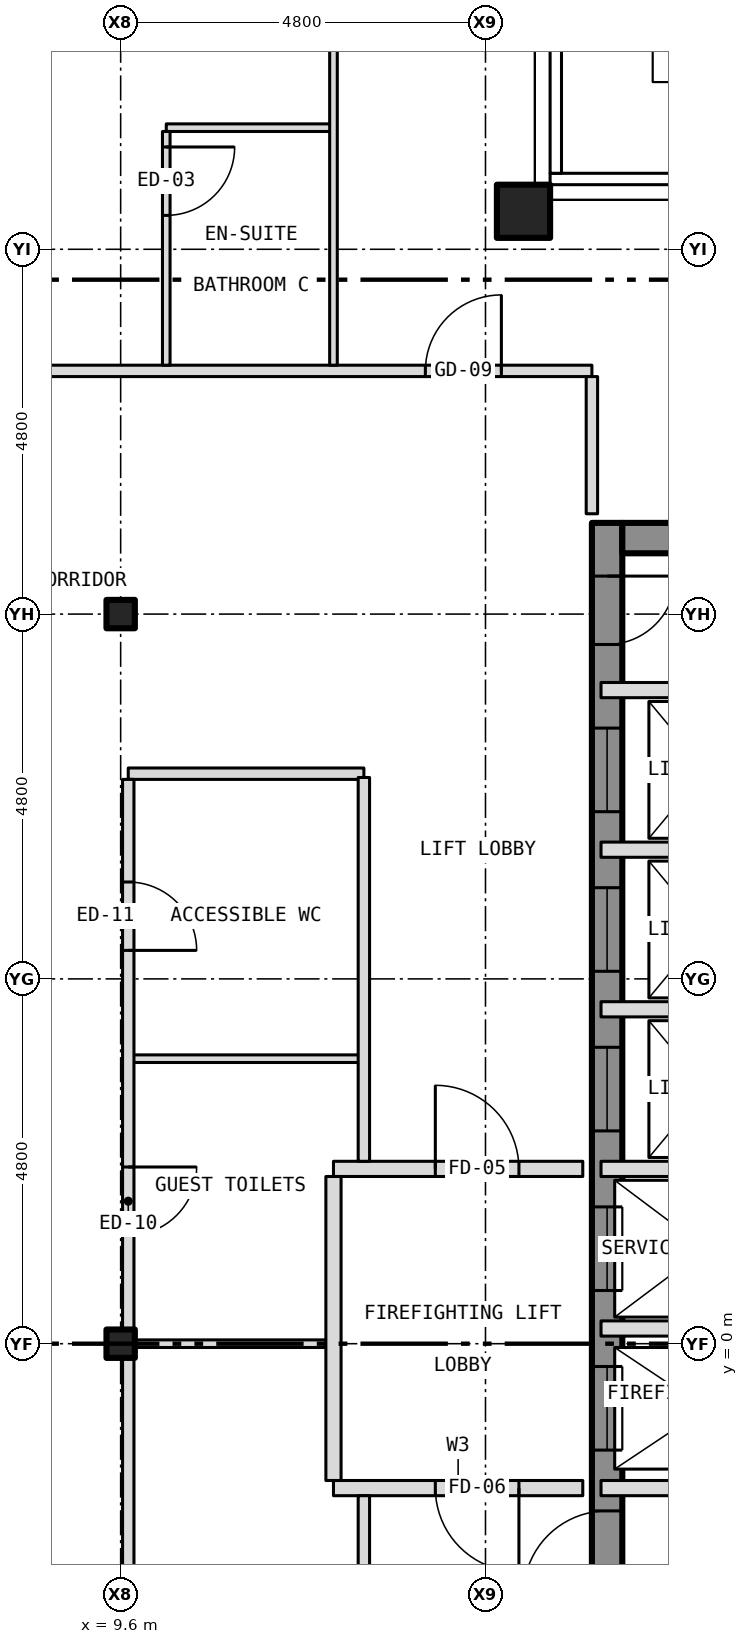
"""IFC4 building model, lengths in metres.
Left out: names, types, materials, properties, quantities, classifications, styles, units other than length and angle.
Written with IfcOpenShell. Run it as: python <this file> out.ifc"""

import sys

from ifc_helpers import new_model, si_unit, direction, frame, frame_2d, origin, origin_2d, place, context, subcontext, project, spatial, rectangle, hollow_rectangle, i_section, extrude, element, fill, save


model = new_model("IFC4")
c1 = context("Model", 3, precision=1e-05, world=origin(), true_north=direction((0.0, 1.0)))
c2 = subcontext(c1, "Body", "Model", "MODEL_VIEW")
j1 = project(units=[si_unit("LENGTHUNIT", "METRE"), si_unit("PLANEANGLEUNIT", "RADIAN")], contexts=[c1])
p1 = place(None, origin())
s1 = spatial("IfcSite", under=j1, at=p1, CompositionType="ELEMENT")
p2 = place(p1, origin())
s2 = spatial("IfcBuilding", under=s1, at=p2, CompositionType="ELEMENT")
p3 = place(p2, frame((0.0, 0.0, 191.0)))
s3 = spatial("IfcBuildingStorey", under=s2, at=p3, CompositionType="ELEMENT", Elevation=191.0)
p4 = place(p3, frame((14.9, 14.9, -0.15), z_axis=(0.0, 0.0, 1.0), x_axis=(1.0, 0.0, 0.0)))
e1 = element("IfcColumn", 1, at=p4, inside=s3, PredefinedType="COLUMN", context=c2, shape_type="SweptSolid", body=[
    extrude(hollow_rectangle(XDim=0.7, YDim=0.7, WallThickness=0.04, at=origin_2d()), origin(), (0.0, 0.0, 1.0), 3.5),
])
for number, where, z_axis, x_axis in (
    (2, (9.6, 0.0, -0.15), (0.0, 0.0, 1.0), (1.0, 0.0, 0.0)),
    (3, (9.6, 9.6, -0.15), (0.0, 0.0, 1.0), (1.0, 0.0, 0.0)),
):
    element("IfcColumn", number, at=place(p3, frame(where, z_axis=z_axis, x_axis=x_axis)), inside=s3, PredefinedType="COLUMN", context=c2, shape_type="SweptSolid", body=[
        extrude(i_section(OverallWidth=0.373, OverallDepth=0.373, WebThickness=0.016, FlangeThickness=0.026, at=origin_2d()), origin(), (0.0, 0.0, 1.0), 3.5),
    ])
p5 = place(p3, frame((16.0, -10.8, 0.0), z_axis=(0.0, 0.0, 1.0), x_axis=(0.0, 1.0, 0.0)))
e4 = element("IfcWall", 4, at=p5, inside=s3, PredefinedType="SHEAR", context=c2, shape_type="SweptSolid", body=[
    extrude(rectangle(XDim=21.6, YDim=0.4, at=frame_2d((10.8, 0.0))), origin(), (0.0, 0.0, 1.0), 3.25),
])
p6 = place(p5, frame((9.4, 0.0, 0.0)))
e5 = element("IfcOpeningElement", 5, at=p6, cuts=e4, PredefinedType="OPENING", context=c2, shape_type="SweptSolid", body=[
    extrude(rectangle(XDim=1.1, YDim=2.1, at=frame_2d((0.55, 1.05))), frame((0.0, 0.212, 0.0), z_axis=(0.0, -1.0, 0.0), x_axis=(1.0, 0.0, 0.0)), (0.0, 0.0, 1.0), 0.424),
])
p7 = place(p5, frame((11.5, 0.0, 0.0)))
e6 = element("IfcOpeningElement", 6, at=p7, cuts=e4, PredefinedType="OPENING", context=c2, shape_type="SweptSolid", body=[
    extrude(rectangle(XDim=1.1, YDim=2.1, at=frame_2d((0.55, 1.05))), frame((0.0, 0.212, 0.0), z_axis=(0.0, -1.0, 0.0), x_axis=(1.0, 0.0, 0.0)), (0.0, 0.0, 1.0), 0.424),
])
p8 = place(p5, frame((13.6, 0.0, 0.0)))
e7 = element("IfcOpeningElement", 7, at=p8, cuts=e4, PredefinedType="OPENING", context=c2, shape_type="SweptSolid", body=[
    extrude(rectangle(XDim=1.1, YDim=2.1, at=frame_2d((0.55, 1.05))), frame((0.0, 0.212, 0.0), z_axis=(0.0, -1.0, 0.0), x_axis=(1.0, 0.0, 0.0)), (0.0, 0.0, 1.0), 0.424),
])
p9 = place(p5, frame((15.7, 0.0, 0.0)))
e8 = element("IfcOpeningElement", 8, at=p9, cuts=e4, PredefinedType="OPENING", context=c2, shape_type="SweptSolid", body=[
    extrude(rectangle(XDim=1.1, YDim=2.1, at=frame_2d((0.55, 1.05))), frame((0.0, 0.212, 0.0), z_axis=(0.0, -1.0, 0.0), x_axis=(1.0, 0.0, 0.0)), (0.0, 0.0, 1.0), 0.424),
])
p10 = place(p5, frame((17.8, 0.0, 0.0)))
e9 = element("IfcOpeningElement", 9, at=p10, cuts=e4, PredefinedType="OPENING", context=c2, shape_type="SweptSolid", body=[
    extrude(rectangle(XDim=1.1, YDim=2.1, at=frame_2d((0.55, 1.05))), frame((0.0, 0.212, 0.0), z_axis=(0.0, -1.0, 0.0), x_axis=(1.0, 0.0, 0.0)), (0.0, 0.0, 1.0), 0.424),
])
p11 = place(p5, frame((5.642, 0.0, 0.0)))
e10 = element("IfcOpeningElement", 10, at=p11, cuts=e4, PredefinedType="OPENING", context=c2, shape_type="SweptSolid", body=[
    extrude(rectangle(XDim=1.1, YDim=2.1, at=frame_2d((0.55, 1.05))), frame((0.0, 0.212, 0.0), z_axis=(0.0, -1.0, 0.0), x_axis=(1.0, 0.0, 0.0)), (0.0, 0.0, 1.0), 0.424),
])
p12 = place(p5, frame((7.5, 0.0, 0.0)))
e11 = element("IfcOpeningElement", 11, at=p12, cuts=e4, PredefinedType="OPENING", context=c2, shape_type="SweptSolid", body=[
    extrude(rectangle(XDim=1.1, YDim=2.1, at=frame_2d((0.55, 1.05))), frame((0.0, 0.212, 0.0), z_axis=(0.0, -1.0, 0.0), x_axis=(1.0, 0.0, 0.0)), (0.0, 0.0, 1.0), 0.424),
])
p13 = place(p5, frame((20.0, 0.0, 0.0)))
e12 = element("IfcOpeningElement", 12, at=p13, cuts=e4, PredefinedType="OPENING", context=c2, shape_type="SweptSolid", body=[
    extrude(rectangle(XDim=0.9, YDim=2.1, at=frame_2d((0.45, 1.05))), frame((0.0, 0.212, 0.0), z_axis=(0.0, -1.0, 0.0), x_axis=(1.0, 0.0, 0.0)), (0.0, 0.0, 1.0), 0.424),
])
p14 = place(p3, frame((16.2, 10.6, 0.0), z_axis=(0.0, 0.0, 1.0), x_axis=(1.0, 0.0, 0.0)))
e13 = element("IfcWall", 13, at=p14, inside=s3, PredefinedType="SHEAR", context=c2, shape_type="SweptSolid", body=[
    extrude(rectangle(XDim=3.8, YDim=0.4, at=frame_2d((1.9, 0.0))), origin(), (0.0, 0.0, 1.0), 3.25),
])
p15 = place(p3, frame((12.4, -1.9, 0.0), z_axis=(0.0, 0.0, 1.0), x_axis=(1.0, 0.0, 0.0)))
e14 = element("IfcWall", 14, at=p15, inside=s3, PredefinedType="PARTITIONING", context=c2, shape_type="SweptSolid", body=[
    extrude(rectangle(XDim=3.28, YDim=0.2, at=frame_2d((1.64, 0.0))), origin(), (0.0, 0.0, 1.0), 3.35),
])
p16 = place(p15, frame((1.34, 0.0, 0.0)))
e15 = element("IfcOpeningElement", 15, at=p16, cuts=e14, PredefinedType="OPENING", context=c2, shape_type="SweptSolid", body=[
    extrude(rectangle(XDim=1.1, YDim=2.1, at=frame_2d((0.55, 1.05))), frame((0.0, 0.112, 0.0), z_axis=(0.0, -1.0, 0.0), x_axis=(1.0, 0.0, 0.0)), (0.0, 0.0, 1.0), 0.224),
])
p17 = place(p3, frame((15.92, -1.9, 0.0), z_axis=(0.0, 0.0, 1.0), x_axis=(1.0, 0.0, 0.0)))
e16 = element("IfcWall", 16, at=p17, inside=s3, PredefinedType="PARTITIONING", context=c2, shape_type="SweptSolid", body=[
    extrude(rectangle(XDim=4.36, YDim=0.2, at=frame_2d((2.18, 0.0))), origin(), (0.0, 0.0, 1.0), 3.25),
])
p18 = place(p17, frame((3.18, 0.0, 0.0)))
e17 = element("IfcOpeningElement", 17, at=p18, cuts=e16, PredefinedType="OPENING", context=c2, shape_type="SweptSolid", body=[
    extrude(rectangle(XDim=0.9, YDim=2.1, at=frame_2d((0.45, 1.05))), frame((0.0, 0.112, 0.0), z_axis=(0.0, -1.0, 0.0), x_axis=(1.0, 0.0, 0.0)), (0.0, 0.0, 1.0), 0.224),
])
p19 = place(p3, frame((9.7, 0.0, 0.0), z_axis=(0.0, 0.0, 1.0), x_axis=(1.0, 0.0, 0.0)))
e18 = element("IfcWall", 18, at=p19, inside=s3, PredefinedType="PARTITIONING", context=c2, shape_type="SweptSolid", body=[
    extrude(rectangle(XDim=2.7, YDim=0.1, at=frame_2d((1.35, 0.0))), origin(), (0.0, 0.0, 1.0), 2.728),
])
p20 = place(p3, frame((15.92, 0.2, 0.0), z_axis=(0.0, 0.0, 1.0), x_axis=(1.0, 0.0, 0.0)))
e19 = element("IfcWall", 19, at=p20, inside=s3, PredefinedType="PARTITIONING", context=c2, shape_type="SweptSolid", body=[
    extrude(rectangle(XDim=2.88, YDim=0.2, at=frame_2d((1.44, 0.0))), origin(), (0.0, 0.0, 1.0), 3.25),
])
p21 = place(p3, frame((12.4, 2.3, 0.0), z_axis=(0.0, 0.0, 1.0), x_axis=(1.0, 0.0, 0.0)))
e20 = element("IfcWall", 20, at=p21, inside=s3, PredefinedType="PARTITIONING", context=c2, shape_type="SweptSolid", body=[
    extrude(rectangle(XDim=3.28, YDim=0.2, at=frame_2d((1.64, 0.0))), origin(), (0.0, 0.0, 1.0), 3.35),
])
p22 = place(p21, frame((1.34, 0.0, 0.0)))
e21 = element("IfcOpeningElement", 21, at=p22, cuts=e20, PredefinedType="OPENING", context=c2, shape_type="SweptSolid", body=[
    extrude(rectangle(XDim=1.1, YDim=2.1, at=frame_2d((0.55, 1.05))), frame((0.0, 0.112, 0.0), z_axis=(0.0, -1.0, 0.0), x_axis=(1.0, 0.0, 0.0)), (0.0, 0.0, 1.0), 0.224),
])
p23 = place(p3, frame((15.92, 2.3, 0.0), z_axis=(0.0, 0.0, 1.0), x_axis=(1.0, 0.0, 0.0)))
e22 = element("IfcWall", 22, at=p23, inside=s3, PredefinedType="PARTITIONING", context=c2, shape_type="SweptSolid", body=[
    extrude(rectangle(XDim=2.88, YDim=0.2, at=frame_2d((1.44, 0.0))), origin(), (0.0, 0.0, 1.0), 3.25),
])
p24 = place(p3, frame((9.7, 3.75, 0.0), z_axis=(0.0, 0.0, 1.0), x_axis=(1.0, 0.0, 0.0)))
e23 = element("IfcWall", 23, at=p24, inside=s3, PredefinedType="PARTITIONING", context=c2, shape_type="SweptSolid", body=[
    extrude(rectangle(XDim=3.1, YDim=0.1, at=frame_2d((1.55, 0.0))), origin(), (0.0, 0.0, 1.0), 3.35),
])
for number, where, z_axis, x_axis in (
    (24, (15.92, 4.4, 0.0), (0.0, 0.0, 1.0), (1.0, 0.0, 0.0)),
    (25, (15.92, 6.5, 0.0), (0.0, 0.0, 1.0), (1.0, 0.0, 0.0)),
):
    element("IfcWall", number, at=place(p3, frame(where, z_axis=z_axis, x_axis=x_axis)), inside=s3, PredefinedType="PARTITIONING", context=c2, shape_type="SweptSolid", body=[
        extrude(rectangle(XDim=2.88, YDim=0.2, at=frame_2d((1.44, 0.0))), origin(), (0.0, 0.0, 1.0), 3.25),
    ])
p25 = place(p3, frame((9.7, 7.5, 0.0), z_axis=(0.0, 0.0, 1.0), x_axis=(1.0, 0.0, 0.0)))
e26 = element("IfcWall", 26, at=p25, inside=s3, PredefinedType="PARTITIONING", context=c2, shape_type="SweptSolid", body=[
    extrude(rectangle(XDim=3.1, YDim=0.15, at=frame_2d((1.55, 0.0))), origin(), (0.0, 0.0, 1.0), 3.35),
])
p26 = place(p3, frame((15.92, 8.6, 0.0), z_axis=(0.0, 0.0, 1.0), x_axis=(1.0, 0.0, 0.0)))
e27 = element("IfcWall", 27, at=p26, inside=s3, PredefinedType="PARTITIONING", context=c2, shape_type="SweptSolid", body=[
    extrude(rectangle(XDim=4.36, YDim=0.2, at=frame_2d((2.18, 0.0))), origin(), (0.0, 0.0, 1.0), 3.25),
])
p27 = place(p3, frame((-15.8, 12.8, 0.0), z_axis=(0.0, 0.0, 1.0), x_axis=(1.0, 0.0, 0.0)))
e28 = element("IfcWall", 28, at=p27, inside=s3, PredefinedType="PARTITIONING", context=c2, shape_type="SweptSolid", body=[
    extrude(rectangle(XDim=31.6, YDim=0.15, at=frame_2d((15.8, 0.0))), origin(), (0.0, 0.0, 1.0), 3.35),
])
p28 = place(p27, frame((7.708, 0.0, 0.0)))
e29 = element("IfcOpeningElement", 29, at=p28, cuts=e28, PredefinedType="OPENING", context=c2, shape_type="SweptSolid", body=[
    extrude(rectangle(XDim=1.0, YDim=2.1, at=frame_2d((0.5, 1.05))), frame((0.0, 0.087, 0.0), z_axis=(0.0, -1.0, 0.0), x_axis=(1.0, 0.0, 0.0)), (0.0, 0.0, 1.0), 0.174),
])
p29 = place(p27, frame((12.568, 0.0, 0.0)))
e30 = element("IfcOpeningElement", 30, at=p29, cuts=e28, PredefinedType="OPENING", context=c2, shape_type="SweptSolid", body=[
    extrude(rectangle(XDim=1.0, YDim=2.1, at=frame_2d((0.5, 1.05))), frame((0.0, 0.087, 0.0), z_axis=(0.0, -1.0, 0.0), x_axis=(1.0, 0.0, 0.0)), (0.0, 0.0, 1.0), 0.174),
])
p30 = place(p27, frame((22.892, 0.0, 0.0)))
e31 = element("IfcOpeningElement", 31, at=p30, cuts=e28, PredefinedType="OPENING", context=c2, shape_type="SweptSolid", body=[
    extrude(rectangle(XDim=1.0, YDim=2.1, at=frame_2d((0.5, 1.05))), frame((0.0, 0.087, 0.0), z_axis=(0.0, -1.0, 0.0), x_axis=(1.0, 0.0, 0.0)), (0.0, 0.0, 1.0), 0.174),
])
p31 = place(p27, frame((1.192, 0.0, 0.0)))
e32 = element("IfcOpeningElement", 32, at=p31, cuts=e28, PredefinedType="OPENING", context=c2, shape_type="SweptSolid", body=[
    extrude(rectangle(XDim=1.0, YDim=2.1, at=frame_2d((0.5, 1.05))), frame((0.0, 0.087, 0.0), z_axis=(0.0, -1.0, 0.0), x_axis=(1.0, 0.0, 0.0)), (0.0, 0.0, 1.0), 0.174),
])
p32 = place(p27, frame((29.409, 0.0, 0.0)))
e33 = element("IfcOpeningElement", 33, at=p32, cuts=e28, PredefinedType="OPENING", context=c2, shape_type="SweptSolid", body=[
    extrude(rectangle(XDim=1.0, YDim=2.1, at=frame_2d((0.5, 1.05))), frame((0.0, 0.087, 0.0), z_axis=(0.0, -1.0, 0.0), x_axis=(1.0, 0.0, 0.0)), (0.0, 0.0, 1.0), 0.174),
])
p33 = place(p3, frame((10.2, 16.0, 0.0), z_axis=(0.0, 0.0, 1.0), x_axis=(1.0, 0.0, 0.0)))
e34 = element("IfcWall", 34, at=p33, inside=s3, PredefinedType="PARTITIONING", context=c2, shape_type="SweptSolid", body=[
    extrude(rectangle(XDim=2.2, YDim=0.1, at=frame_2d((1.1, 0.0))), origin(), (0.0, 0.0, 1.0), 3.35),
])
p34 = place(p3, frame((9.7, -9.413, 0.0), z_axis=(0.0, 0.0, 1.0), x_axis=(0.0, 1.0, 0.0)))
e35 = element("IfcWall", 35, at=p34, inside=s3, PredefinedType="PARTITIONING", context=c2, shape_type="SweptSolid", body=[
    extrude(rectangle(XDim=9.226, YDim=0.15, at=frame_2d((4.613, 0.0))), origin(), (0.0, 0.0, 1.0), 2.728),
])
p35 = place(p34, frame((3.663, 0.0, 0.0)))
e36 = element("IfcOpeningElement", 36, at=p35, cuts=e35, PredefinedType="OPENING", context=c2, shape_type="SweptSolid", body=[
    extrude(rectangle(XDim=0.9, YDim=2.1, at=frame_2d((0.45, 1.05))), frame((0.0, 0.087, 0.0), z_axis=(0.0, -1.0, 0.0), x_axis=(1.0, 0.0, 0.0)), (0.0, 0.0, 1.0), 0.174),
])
p36 = place(p3, frame((9.7, -0.187, 0.0), z_axis=(0.0, 0.0, 1.0), x_axis=(0.0, 1.0, 0.0)))
e37 = element("IfcWall", 37, at=p36, inside=s3, PredefinedType="PARTITIONING", context=c2, shape_type="SweptSolid", body=[
    extrude(rectangle(XDim=0.374, YDim=0.15, at=frame_2d((0.187, 0.0))), origin(), (0.0, 0.0, 1.0), 3.35),
])
p37 = place(p3, frame((9.7, 0.187, 0.0), z_axis=(0.0, 0.0, 1.0), x_axis=(0.0, 1.0, 0.0)))
e38 = element("IfcWall", 38, at=p37, inside=s3, PredefinedType="PARTITIONING", context=c2, shape_type="SweptSolid", body=[
    extrude(rectangle(XDim=7.238, YDim=0.15, at=frame_2d((3.619, 0.0))), origin(), (0.0, 0.0, 1.0), 2.728),
])
p38 = place(p37, frame((1.238, 0.0, 0.0)))
e39 = element("IfcOpeningElement", 39, at=p38, cuts=e38, PredefinedType="OPENING", context=c2, shape_type="SweptSolid", body=[
    extrude(rectangle(XDim=0.9, YDim=2.1, at=frame_2d((0.45, 1.05))), frame((0.0, 0.087, 0.0), z_axis=(0.0, -1.0, 0.0), x_axis=(1.0, 0.0, 0.0)), (0.0, 0.0, 1.0), 0.174),
])
p39 = place(p37, frame((4.988, 0.0, 0.0)))
e40 = element("IfcOpeningElement", 40, at=p39, cuts=e38, PredefinedType="OPENING", context=c2, shape_type="SweptSolid", body=[
    extrude(rectangle(XDim=0.9, YDim=2.1, at=frame_2d((0.45, 1.05))), frame((0.0, 0.087, 0.0), z_axis=(0.0, -1.0, 0.0), x_axis=(1.0, 0.0, 0.0)), (0.0, 0.0, 1.0), 0.174),
])
p40 = place(p3, frame((10.2, 12.875, 0.0), z_axis=(0.0, 0.0, 1.0), x_axis=(0.0, 1.0, 0.0)))
e41 = element("IfcWall", 41, at=p40, inside=s3, PredefinedType="PARTITIONING", context=c2, shape_type="SweptSolid", body=[
    extrude(rectangle(XDim=3.075, YDim=0.1, at=frame_2d((1.538, 0.0))), origin(), (0.0, 0.0, 1.0), 3.35),
])
p41 = place(p40, frame((1.971, 0.0, 0.0)))
e42 = element("IfcOpeningElement", 42, at=p41, cuts=e41, PredefinedType="OPENING", context=c2, shape_type="SweptSolid", body=[
    extrude(rectangle(XDim=0.9, YDim=2.1, at=frame_2d((0.45, 1.05))), frame((0.0, 0.062, 0.0), z_axis=(0.0, -1.0, 0.0), x_axis=(1.0, 0.0, 0.0)), (0.0, 0.0, 1.0), 0.124),
])
p42 = place(p3, frame((12.4, -1.8, 0.0), z_axis=(0.0, 0.0, 1.0), x_axis=(0.0, 1.0, 0.0)))
e43 = element("IfcWall", 43, at=p42, inside=s3, PredefinedType="PARTITIONING", context=c2, shape_type="SweptSolid", body=[
    extrude(rectangle(XDim=4.0, YDim=0.2, at=frame_2d((2.0, 0.0))), origin(), (0.0, 0.0, 1.0), 3.35),
])
p43 = place(p3, frame((12.4, 12.875, 0.0), z_axis=(0.0, 0.0, 1.0), x_axis=(0.0, 1.0, 0.0)))
e44 = element("IfcWall", 44, at=p43, inside=s3, PredefinedType="PARTITIONING", context=c2, shape_type="SweptSolid", body=[
    extrude(rectangle(XDim=7.905, YDim=0.1, at=frame_2d((3.953, 0.0))), origin(), (0.0, 0.0, 1.0), 3.35),
])
p44 = place(p3, frame((12.8, -10.525, 0.0), z_axis=(0.0, 0.0, 1.0), x_axis=(0.0, 1.0, 0.0)))
e45 = element("IfcWall", 45, at=p44, inside=s3, PredefinedType="PARTITIONING", context=c2, shape_type="SweptSolid", body=[
    extrude(rectangle(XDim=8.525, YDim=0.15, at=frame_2d((4.262, 0.0))), origin(), (0.0, 0.0, 1.0), 3.35),
])
p45 = place(p3, frame((12.8, 2.4, 0.0), z_axis=(0.0, 0.0, 1.0), x_axis=(0.0, 1.0, 0.0)))
e46 = element("IfcWall", 46, at=p45, inside=s3, PredefinedType="PARTITIONING", context=c2, shape_type="SweptSolid", body=[
    extrude(rectangle(XDim=5.05, YDim=0.15, at=frame_2d((2.525, 0.0))), origin(), (0.0, 0.0, 1.0), 3.35),
])
p46 = place(p3, frame((15.8, 10.92, 0.0), z_axis=(0.0, 0.0, 1.0), x_axis=(0.0, 1.0, 0.0)))
e47 = element("IfcWall", 47, at=p46, inside=s3, PredefinedType="PARTITIONING", context=c2, shape_type="SweptSolid", body=[
    extrude(rectangle(XDim=1.805, YDim=0.15, at=frame_2d((0.903, 0.0))), origin(), (0.0, 0.0, 1.0), 3.35),
])
p47 = place(p6, origin())
e48 = element("IfcDoor", 48, at=p47, inside=s3, OperationType="SLIDING_TO_LEFT", PredefinedType="DOOR", context=c2, shape_type="SweptSolid", body=[
    extrude(rectangle(XDim=1.1, YDim=2.1, at=frame_2d((0.55, 1.05))), frame((0.0, 0.025, 0.0), z_axis=(0.0, -1.0, 0.0), x_axis=(1.0, 0.0, 0.0)), (0.0, 0.0, 1.0), 0.05),
])
fill(e5, e48)
p48 = place(p7, origin())
e49 = element("IfcDoor", 49, at=p48, inside=s3, OperationType="SLIDING_TO_LEFT", PredefinedType="DOOR", context=c2, shape_type="SweptSolid", body=[
    extrude(rectangle(XDim=1.1, YDim=2.1, at=frame_2d((0.55, 1.05))), frame((0.0, 0.025, 0.0), z_axis=(0.0, -1.0, 0.0), x_axis=(1.0, 0.0, 0.0)), (0.0, 0.0, 1.0), 0.05),
])
fill(e6, e49)
p49 = place(p8, origin())
e50 = element("IfcDoor", 50, at=p49, inside=s3, OperationType="SLIDING_TO_LEFT", PredefinedType="DOOR", context=c2, shape_type="SweptSolid", body=[
    extrude(rectangle(XDim=1.1, YDim=2.1, at=frame_2d((0.55, 1.05))), frame((0.0, 0.025, 0.0), z_axis=(0.0, -1.0, 0.0), x_axis=(1.0, 0.0, 0.0)), (0.0, 0.0, 1.0), 0.05),
])
fill(e7, e50)
p50 = place(p9, origin())
e51 = element("IfcDoor", 51, at=p50, inside=s3, OperationType="SLIDING_TO_LEFT", PredefinedType="DOOR", context=c2, shape_type="SweptSolid", body=[
    extrude(rectangle(XDim=1.1, YDim=2.1, at=frame_2d((0.55, 1.05))), frame((0.0, 0.025, 0.0), z_axis=(0.0, -1.0, 0.0), x_axis=(1.0, 0.0, 0.0)), (0.0, 0.0, 1.0), 0.05),
])
fill(e8, e51)
p51 = place(p10, origin())
e52 = element("IfcDoor", 52, at=p51, inside=s3, OperationType="SLIDING_TO_LEFT", PredefinedType="DOOR", context=c2, shape_type="SweptSolid", body=[
    extrude(rectangle(XDim=1.1, YDim=2.1, at=frame_2d((0.55, 1.05))), frame((0.0, 0.025, 0.0), z_axis=(0.0, -1.0, 0.0), x_axis=(1.0, 0.0, 0.0)), (0.0, 0.0, 1.0), 0.05),
])
fill(e9, e52)
p52 = place(p12, origin())
e53 = element("IfcDoor", 53, at=p52, inside=s3, OperationType="SINGLE_SWING_LEFT", PredefinedType="DOOR", context=c2, shape_type="SweptSolid", body=[
    extrude(rectangle(XDim=1.1, YDim=2.1, at=frame_2d((0.55, 1.05))), frame((0.0, 0.025, 0.0), z_axis=(0.0, -1.0, 0.0), x_axis=(1.0, 0.0, 0.0)), (0.0, 0.0, 1.0), 0.05),
])
fill(e11, e53)
p53 = place(p13, origin())
e54 = element("IfcDoor", 54, at=p53, inside=s3, OperationType="SINGLE_SWING_RIGHT", PredefinedType="DOOR", context=c2, shape_type="SweptSolid", body=[
    extrude(rectangle(XDim=0.9, YDim=2.1, at=frame_2d((0.45, 1.05))), frame((0.0, 0.025, 0.0), z_axis=(0.0, -1.0, 0.0), x_axis=(1.0, 0.0, 0.0)), (0.0, 0.0, 1.0), 0.05),
])
fill(e12, e54)
p54 = place(p22, origin())
e55 = element("IfcDoor", 55, at=p54, inside=s3, OperationType="SINGLE_SWING_LEFT", PredefinedType="DOOR", context=c2, shape_type="SweptSolid", body=[
    extrude(rectangle(XDim=1.1, YDim=2.1, at=frame_2d((0.55, 1.05))), frame((0.0, 0.025, 0.0), z_axis=(0.0, -1.0, 0.0), x_axis=(1.0, 0.0, 0.0)), (0.0, 0.0, 1.0), 0.05),
])
fill(e21, e55)
p55 = place(p16, origin())
e56 = element("IfcDoor", 56, at=p55, inside=s3, OperationType="SINGLE_SWING_RIGHT", PredefinedType="DOOR", context=c2, shape_type="SweptSolid", body=[
    extrude(rectangle(XDim=1.1, YDim=2.1, at=frame_2d((0.55, 1.05))), frame((0.0, 0.025, 0.0), z_axis=(0.0, -1.0, 0.0), x_axis=(1.0, 0.0, 0.0)), (0.0, 0.0, 1.0), 0.05),
])
fill(e15, e56)
p56 = place(p41, origin())
e57 = element("IfcDoor", 57, at=p56, inside=s3, OperationType="SINGLE_SWING_RIGHT", PredefinedType="DOOR", context=c2, shape_type="SweptSolid", body=[
    extrude(rectangle(XDim=0.9, YDim=2.1, at=frame_2d((0.45, 1.05))), frame((0.0, 0.025, 0.0), z_axis=(0.0, -1.0, 0.0), x_axis=(1.0, 0.0, 0.0)), (0.0, 0.0, 1.0), 0.05),
])
fill(e42, e57)
p57 = place(p32, origin())
e58 = element("IfcDoor", 58, at=p57, inside=s3, OperationType="SINGLE_SWING_RIGHT", PredefinedType="DOOR", context=c2, shape_type="SweptSolid", body=[
    extrude(rectangle(XDim=1.0, YDim=2.1, at=frame_2d((0.5, 1.05))), frame((0.0, 0.025, 0.0), z_axis=(0.0, -1.0, 0.0), x_axis=(1.0, 0.0, 0.0)), (0.0, 0.0, 1.0), 0.05),
])
fill(e33, e58)
p58 = place(p38, origin())
e59 = element("IfcDoor", 59, at=p58, inside=s3, OperationType="SINGLE_SWING_RIGHT", PredefinedType="DOOR", context=c2, shape_type="SweptSolid", body=[
    extrude(rectangle(XDim=0.9, YDim=2.1, at=frame_2d((0.45, 1.05))), frame((0.0, 0.025, 0.0), z_axis=(0.0, -1.0, 0.0), x_axis=(1.0, 0.0, 0.0)), (0.0, 0.0, 1.0), 0.05),
])
fill(e39, e59)
p59 = place(p39, origin())
e60 = element("IfcDoor", 60, at=p59, inside=s3, OperationType="SINGLE_SWING_LEFT", PredefinedType="DOOR", context=c2, shape_type="SweptSolid", body=[
    extrude(rectangle(XDim=0.9, YDim=2.1, at=frame_2d((0.45, 1.05))), frame((0.0, 0.025, 0.0), z_axis=(0.0, -1.0, 0.0), x_axis=(1.0, 0.0, 0.0)), (0.0, 0.0, 1.0), 0.05),
])
fill(e40, e60)
save(model, sys.argv[1])
